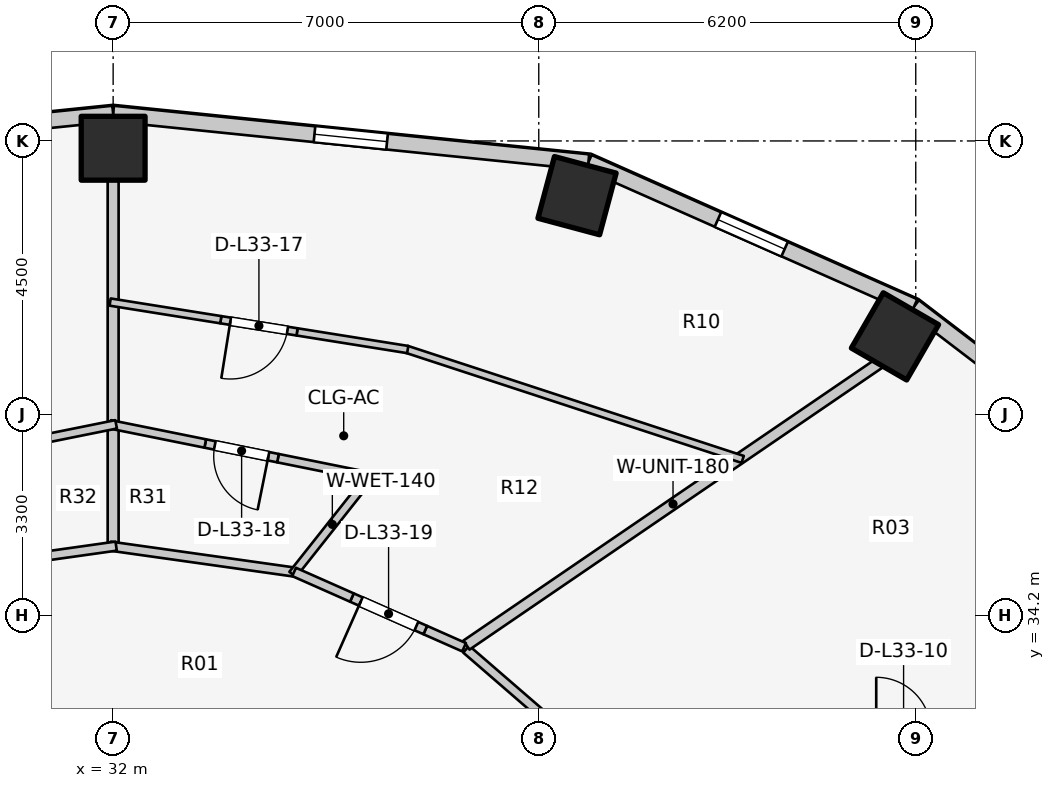
"""IFC4 building model, lengths in metres.
Left out: names, types, materials, properties, quantities, classifications, styles, units other than length and angle.
Written with IfcOpenShell. Run it as: python <this file> out.ifc"""

import sys

from ifc_helpers import new_model, si_unit, direction, frame, frame_2d, origin, origin_2d, place, context, subcontext, project, spatial, rectangle, extrude, element, fill, save


model = new_model("IFC4")
c1 = context("Model", 3, precision=1e-05, world=origin(), true_north=direction((0.0, 1.0)))
c2 = subcontext(c1, "Body", "Model", "MODEL_VIEW")
j1 = project(units=[si_unit("LENGTHUNIT", "METRE"), si_unit("PLANEANGLEUNIT", "RADIAN")], contexts=[c1])
p1 = place(None, origin())
s1 = spatial("IfcSite", under=j1, at=p1, CompositionType="ELEMENT")
p2 = place(p1, origin())
s2 = spatial("IfcBuilding", under=s1, at=p2, CompositionType="ELEMENT")
p3 = place(p2, frame((0.0, 0.0, 110.4)))
s3 = spatial("IfcBuildingStorey", under=s2, at=p3, CompositionType="ELEMENT", Elevation=110.4)
for number, where, z_axis, x_axis in (
    (1, (44.858, 38.786, 0.0), (0.0, 0.0, 1.0), (0.5, 0.866, 0.0)),
    (2, (39.629, 41.1, 0.0), (0.0, 0.0, 1.0), (0.259, 0.966, 0.0)),
    (3, (32.0, 41.88, 0.0), (0.0, 0.0, 1.0), (0.0, 1.0, 0.0)),
):
    element("IfcColumn", number, at=place(p3, frame(where, z_axis=z_axis, x_axis=x_axis)), inside=s3, PredefinedType="COLUMN", context=c2, shape_type="SweptSolid", body=[
        extrude(rectangle(XDim=1.05, YDim=1.05, at=origin_2d()), origin(), (0.0, 0.0, 1.0), 3.1),
    ])
p4 = place(p3, frame((49.266, 36.153, 0.0), z_axis=(0.0, 0.0, 1.0), x_axis=(-0.794809810864, 0.606858603427, 0.0)))
e4 = element("IfcWall", 4, at=p4, inside=s3, PredefinedType="STANDARD", context=c2, shape_type="SweptSolid", body=[
    extrude(rectangle(XDim=5.149, YDim=0.26, at=frame_2d((2.575, 0.0))), origin(), (0.0, 0.0, 1.0), 1.22),
])
p5 = place(p3, frame((45.173, 39.278, 0.0), z_axis=(0.0, 0.0, 1.0), x_axis=(-0.914336605747, 0.404955023911, 0.0)))
e5 = element("IfcWall", 5, at=p5, inside=s3, PredefinedType="STANDARD", context=c2, shape_type="SweptSolid", body=[
    extrude(rectangle(XDim=5.859, YDim=0.26, at=frame_2d((2.929, 0.0))), origin(), (0.0, 0.0, 1.0), 1.22),
])
p6 = place(p5, frame((2.329, 0.0, 0.15)))
e6 = element("IfcOpeningElement", 6, at=p6, cuts=e5, PredefinedType="OPENING", context=c2, shape_type="SweptSolid", body=[
    extrude(rectangle(XDim=1.2, YDim=0.9, at=frame_2d((0.6, 0.45))), frame((0.0, 0.14, 0.0), z_axis=(0.0, -1.0, 0.0), x_axis=(1.0, 0.0, 0.0)), (0.0, 0.0, 1.0), 0.28),
])
p7 = place(p3, frame((39.816, 41.651, 0.0), z_axis=(0.0, 0.0, 1.0), x_axis=(-0.994821390558, 0.101638579726, 0.0)))
e7 = element("IfcWall", 7, at=p7, inside=s3, PredefinedType="STANDARD", context=c2, shape_type="SweptSolid", body=[
    extrude(rectangle(XDim=7.857, YDim=0.26, at=frame_2d((3.929, 0.0))), origin(), (0.0, 0.0, 1.0), 1.22),
])
p8 = place(p7, frame((3.329, 0.0, 0.15)))
e8 = element("IfcOpeningElement", 8, at=p8, cuts=e7, PredefinedType="OPENING", context=c2, shape_type="SweptSolid", body=[
    extrude(rectangle(XDim=1.2, YDim=0.9, at=frame_2d((0.6, 0.45))), frame((0.0, 0.14, 0.0), z_axis=(0.0, -1.0, 0.0), x_axis=(1.0, 0.0, 0.0)), (0.0, 0.0, 1.0), 0.28),
])
p9 = place(p3, frame((32.0, 42.449, 0.0), z_axis=(0.0, 0.0, 1.0), x_axis=(-0.994821390558, -0.101638579726, 0.0)))
e9 = element("IfcWall", 9, at=p9, inside=s3, PredefinedType="STANDARD", context=c2, shape_type="SweptSolid", body=[
    extrude(rectangle(XDim=7.857, YDim=0.26, at=frame_2d((3.929, 0.0))), origin(), (0.0, 0.0, 1.0), 1.22),
])
p10 = place(p9, frame((3.329, 0.0, 0.15)))
e10 = element("IfcOpeningElement", 10, at=p10, cuts=e9, PredefinedType="OPENING", context=c2, shape_type="SweptSolid", body=[
    extrude(rectangle(XDim=1.2, YDim=0.9, at=frame_2d((0.6, 0.45))), frame((0.0, 0.14, 0.0), z_axis=(0.0, -1.0, 0.0), x_axis=(1.0, 0.0, 0.0)), (0.0, 0.0, 1.0), 0.28),
])
p11 = place(p3, frame((37.807, 33.642, 0.0), z_axis=(0.0, 0.0, 1.0), x_axis=(0.756055312247, -0.654507727092, 0.0)))
e11 = element("IfcWall", 11, at=p11, inside=s3, PredefinedType="PARTITIONING", context=c2, shape_type="SweptSolid", body=[
    extrude(rectangle(XDim=2.111, YDim=0.15, at=frame_2d((1.055, 0.0))), origin(), (0.0, 0.0, 1.0), 1.992),
])
p12 = place(p3, frame((37.81, 33.709, 0.0), z_axis=(0.0, 0.0, 1.0), x_axis=(0.825850521911, 0.563889098546, 0.0)))
e12 = element("IfcWall", 12, at=p12, inside=s3, PredefinedType="PARTITIONING", context=c2, shape_type="SweptSolid", body=[
    extrude(rectangle(XDim=8.228, YDim=0.18, at=frame_2d((4.114, 0.0))), origin(), (0.0, 0.0, 1.0), 1.22),
])
p13 = place(p3, frame((32.0, 35.385, 0.0), z_axis=(0.0, 0.0, 1.0), x_axis=(0.0, 1.0, 0.0)))
e13 = element("IfcWall", 13, at=p13, inside=s3, PredefinedType="PARTITIONING", context=c2, shape_type="SweptSolid", body=[
    extrude(rectangle(XDim=5.99, YDim=0.18, at=frame_2d((2.995, 0.0))), origin(), (0.0, 0.0, 1.0), 1.22),
])
p14 = place(p3, frame((42.354, 36.763, 0.0), z_axis=(0.0, 0.0, 1.0), x_axis=(-0.950307315297, 0.311313357396, 0.0)))
e14 = element("IfcWall", 14, at=p14, inside=s3, PredefinedType="MOVABLE", context=c2, shape_type="SweptSolid", body=[
    extrude(rectangle(XDim=5.817, YDim=0.12, at=frame_2d((2.909, 0.0))), origin(), (0.0, 0.0, 1.0), 1.992),
])
p15 = place(p3, frame((36.845, 38.57, 0.0), z_axis=(0.0, 0.0, 1.0), x_axis=(-0.987498427073, 0.157628856904, 0.0)))
e15 = element("IfcWall", 15, at=p15, inside=s3, PredefinedType="MOVABLE", context=c2, shape_type="SweptSolid", body=[
    extrude(rectangle(XDim=1.843, YDim=0.12, at=frame_2d((0.921, 0.0))), origin(), (0.0, 0.0, 1.0), 2.575),
])
p16 = place(p3, frame((35.025, 38.86, 0.0), z_axis=(0.0, 0.0, 1.0), x_axis=(-0.987498146108, 0.157630617054, 0.0)))
e16 = element("IfcWall", 16, at=p16, inside=s3, PredefinedType="MOVABLE", context=c2, shape_type="SweptSolid", body=[
    extrude(rectangle(XDim=1.27, YDim=0.12, at=frame_2d((0.635, 0.0))), origin(), (0.0, 0.0, 1.0), 2.575),
])
p17 = place(p16, frame((0.16, 0.0, 0.0)))
e17 = element("IfcOpeningElement", 17, at=p17, cuts=e16, PredefinedType="OPENING", context=c2, shape_type="SweptSolid", body=[
    extrude(rectangle(XDim=0.95, YDim=2.1, at=frame_2d((0.475, 1.05))), frame((0.0, 0.07, 0.0), z_axis=(0.0, -1.0, 0.0), x_axis=(1.0, 0.0, 0.0)), (0.0, 0.0, 1.0), 0.14),
])
p18 = place(p3, frame((33.771, 39.06, 0.0), z_axis=(0.0, 0.0, 1.0), x_axis=(-0.98751575117, 0.157520288186, 0.0)))
e18 = element("IfcWall", 18, at=p18, inside=s3, PredefinedType="MOVABLE", context=c2, shape_type="SweptSolid", body=[
    extrude(rectangle(XDim=1.843, YDim=0.12, at=frame_2d((0.921, 0.0))), origin(), (0.0, 0.0, 1.0), 1.992),
])
p19 = place(p3, frame((35.034, 34.903, 0.0), z_axis=(0.0, 0.0, 1.0), x_axis=(-0.990234434447, 0.139412211929, 0.0)))
e19 = element("IfcWall", 19, at=p19, inside=s3, PredefinedType="PARTITIONING", context=c2, shape_type="SweptSolid", body=[
    extrude(rectangle(XDim=3.114, YDim=0.15, at=frame_2d((1.557, 0.0))), origin(), (0.0, 0.0, 1.0), 1.992),
])
p20 = place(p3, frame((34.953, 34.871, 0.0), z_axis=(0.0, 0.0, 1.0), x_axis=(0.620702944366, 0.784045824462, 0.0)))
e20 = element("IfcWall", 20, at=p20, inside=s3, PredefinedType="PLUMBINGWALL", context=c2, shape_type="SweptSolid", body=[
    extrude(rectangle(XDim=2.1, YDim=0.14, at=frame_2d((1.05, 0.0))), origin(), (0.0, 0.0, 1.0), 2.105),
])
p21 = place(p3, frame((36.275, 36.468, 0.0), z_axis=(0.0, 0.0, 1.0), x_axis=(-0.980261572321, 0.197704956516, 0.0)))
e21 = element("IfcWall", 21, at=p21, inside=s3, PredefinedType="PLUMBINGWALL", context=c2, shape_type="SweptSolid", body=[
    extrude(rectangle(XDim=1.595, YDim=0.14, at=frame_2d((0.798, 0.0))), origin(), (0.0, 0.0, 1.0), 2.575),
])
p22 = place(p3, frame((34.711, 36.783, 0.0), z_axis=(0.0, 0.0, 1.0), x_axis=(-0.980256050043, 0.197732335125, 0.0)))
e22 = element("IfcWall", 22, at=p22, inside=s3, PredefinedType="PLUMBINGWALL", context=c2, shape_type="SweptSolid", body=[
    extrude(rectangle(XDim=1.22, YDim=0.14, at=frame_2d((0.61, 0.0))), origin(), (0.0, 0.0, 1.0), 2.575),
])
p23 = place(p22, frame((0.16, 0.0, 0.0)))
e23 = element("IfcOpeningElement", 23, at=p23, cuts=e22, PredefinedType="OPENING", context=c2, shape_type="SweptSolid", body=[
    extrude(rectangle(XDim=0.9, YDim=2.1, at=frame_2d((0.45, 1.05))), frame((0.0, 0.08, 0.0), z_axis=(0.0, -1.0, 0.0), x_axis=(1.0, 0.0, 0.0)), (0.0, 0.0, 1.0), 0.16),
])
p24 = place(p3, frame((33.515, 37.025, 0.0), z_axis=(0.0, 0.0, 1.0), x_axis=(-0.980291218326, 0.197557908657, 0.0)))
e24 = element("IfcWall", 24, at=p24, inside=s3, PredefinedType="PLUMBINGWALL", context=c2, shape_type="SweptSolid", body=[
    extrude(rectangle(XDim=1.595, YDim=0.14, at=frame_2d((0.798, 0.0))), origin(), (0.0, 0.0, 1.0), 1.992),
])
p25 = place(p3, frame((37.772, 33.674, 0.0), z_axis=(0.0, 0.0, 1.0), x_axis=(-0.914415935028, 0.404775861148, 0.0)))
e25 = element("IfcWall", 25, at=p25, inside=s3, PredefinedType="PARTITIONING", context=c2, shape_type="SweptSolid", body=[
    extrude(rectangle(XDim=0.698, YDim=0.15, at=frame_2d((0.349, 0.0))), origin(), (0.0, 0.0, 1.0), 2.575),
])
p26 = place(p3, frame((37.133, 33.957, 0.0), z_axis=(0.0, 0.0, 1.0), x_axis=(-0.914283830307, 0.405074163134, 0.0)))
e26 = element("IfcWall", 26, at=p26, inside=s3, PredefinedType="PARTITIONING", context=c2, shape_type="SweptSolid", body=[
    extrude(rectangle(XDim=1.32, YDim=0.15, at=frame_2d((0.66, 0.0))), origin(), (0.0, 0.0, 1.0), 2.16),
])
p27 = place(p26, frame((0.16, 0.0, 0.0)))
e27 = element("IfcOpeningElement", 27, at=p27, cuts=e26, PredefinedType="OPENING", context=c2, shape_type="SweptSolid", body=[
    extrude(rectangle(XDim=1.0, YDim=2.1, at=frame_2d((0.5, 1.05))), frame((0.0, 0.085, 0.0), z_axis=(0.0, -1.0, 0.0), x_axis=(1.0, 0.0, 0.0)), (0.0, 0.0, 1.0), 0.17),
])
p28 = place(p3, frame((35.927, 34.491, 0.0), z_axis=(0.0, 0.0, 1.0), x_axis=(-0.914314594958, 0.405004717808, 0.0)))
e28 = element("IfcWall", 28, at=p28, inside=s3, PredefinedType="PARTITIONING", context=c2, shape_type="SweptSolid", body=[
    extrude(rectangle(XDim=1.039, YDim=0.15, at=frame_2d((0.52, 0.0))), origin(), (0.0, 0.0, 1.0), 1.992),
])
p29 = place(p3, frame((32.05, 35.337, 0.0), z_axis=(0.0, 0.0, 1.0), x_axis=(-0.990234434447, -0.139412211929, 0.0)))
e29 = element("IfcWall", 29, at=p29, inside=s3, PredefinedType="PARTITIONING", context=c2, shape_type="SweptSolid", body=[
    extrude(rectangle(XDim=3.114, YDim=0.15, at=frame_2d((1.557, 0.0))), origin(), (0.0, 0.0, 1.0), 1.992),
])
p30 = place(p3, frame((32.049, 37.34, 0.0), z_axis=(0.0, 0.0, 1.0), x_axis=(-0.980291218326, -0.197557908657, 0.0)))
e30 = element("IfcWall", 30, at=p30, inside=s3, PredefinedType="PLUMBINGWALL", context=c2, shape_type="SweptSolid", body=[
    extrude(rectangle(XDim=1.595, YDim=0.14, at=frame_2d((0.798, 0.0))), origin(), (0.0, 0.0, 1.0), 1.992),
])
p31 = place(p6, origin())
e31 = element("IfcWindow", 31, at=p31, inside=s3, PartitioningType="SINGLE_PANEL", PredefinedType="WINDOW", context=c2, shape_type="SweptSolid", body=[
    extrude(rectangle(XDim=1.2, YDim=0.9, at=frame_2d((0.6, 0.45))), frame((0.0, 0.03, 0.0), z_axis=(0.0, -1.0, 0.0), x_axis=(1.0, 0.0, 0.0)), (0.0, 0.0, 1.0), 0.06),
])
fill(e6, e31)
p32 = place(p8, origin())
e32 = element("IfcWindow", 32, at=p32, inside=s3, PartitioningType="SINGLE_PANEL", PredefinedType="WINDOW", context=c2, shape_type="SweptSolid", body=[
    extrude(rectangle(XDim=1.2, YDim=0.9, at=frame_2d((0.6, 0.45))), frame((0.0, 0.03, 0.0), z_axis=(0.0, -1.0, 0.0), x_axis=(1.0, 0.0, 0.0)), (0.0, 0.0, 1.0), 0.06),
])
fill(e8, e32)
p33 = place(p17, origin())
e33 = element("IfcDoor", 33, at=p33, inside=s3, OperationType="SINGLE_SWING_RIGHT", PredefinedType="DOOR", context=c2, shape_type="SweptSolid", body=[
    extrude(rectangle(XDim=0.95, YDim=2.1, at=frame_2d((0.475, 1.05))), frame((0.0, 0.025, 0.0), z_axis=(0.0, -1.0, 0.0), x_axis=(1.0, 0.0, 0.0)), (0.0, 0.0, 1.0), 0.05),
])
fill(e17, e33)
p34 = place(p23, origin())
e34 = element("IfcDoor", 34, at=p34, inside=s3, OperationType="SINGLE_SWING_LEFT", PredefinedType="DOOR", context=c2, shape_type="SweptSolid", body=[
    extrude(rectangle(XDim=0.9, YDim=2.1, at=frame_2d((0.45, 1.05))), frame((0.0, 0.025, 0.0), z_axis=(0.0, -1.0, 0.0), x_axis=(1.0, 0.0, 0.0)), (0.0, 0.0, 1.0), 0.05),
])
fill(e23, e34)
p35 = place(p27, origin())
e35 = element("IfcDoor", 35, at=p35, inside=s3, OperationType="SINGLE_SWING_RIGHT", PredefinedType="DOOR", context=c2, shape_type="SweptSolid", body=[
    extrude(rectangle(XDim=1.0, YDim=2.1, at=frame_2d((0.5, 1.05))), frame((0.0, 0.025, 0.0), z_axis=(0.0, -1.0, 0.0), x_axis=(1.0, 0.0, 0.0)), (0.0, 0.0, 1.0), 0.05),
])
fill(e27, e35)
save(model, sys.argv[1])
